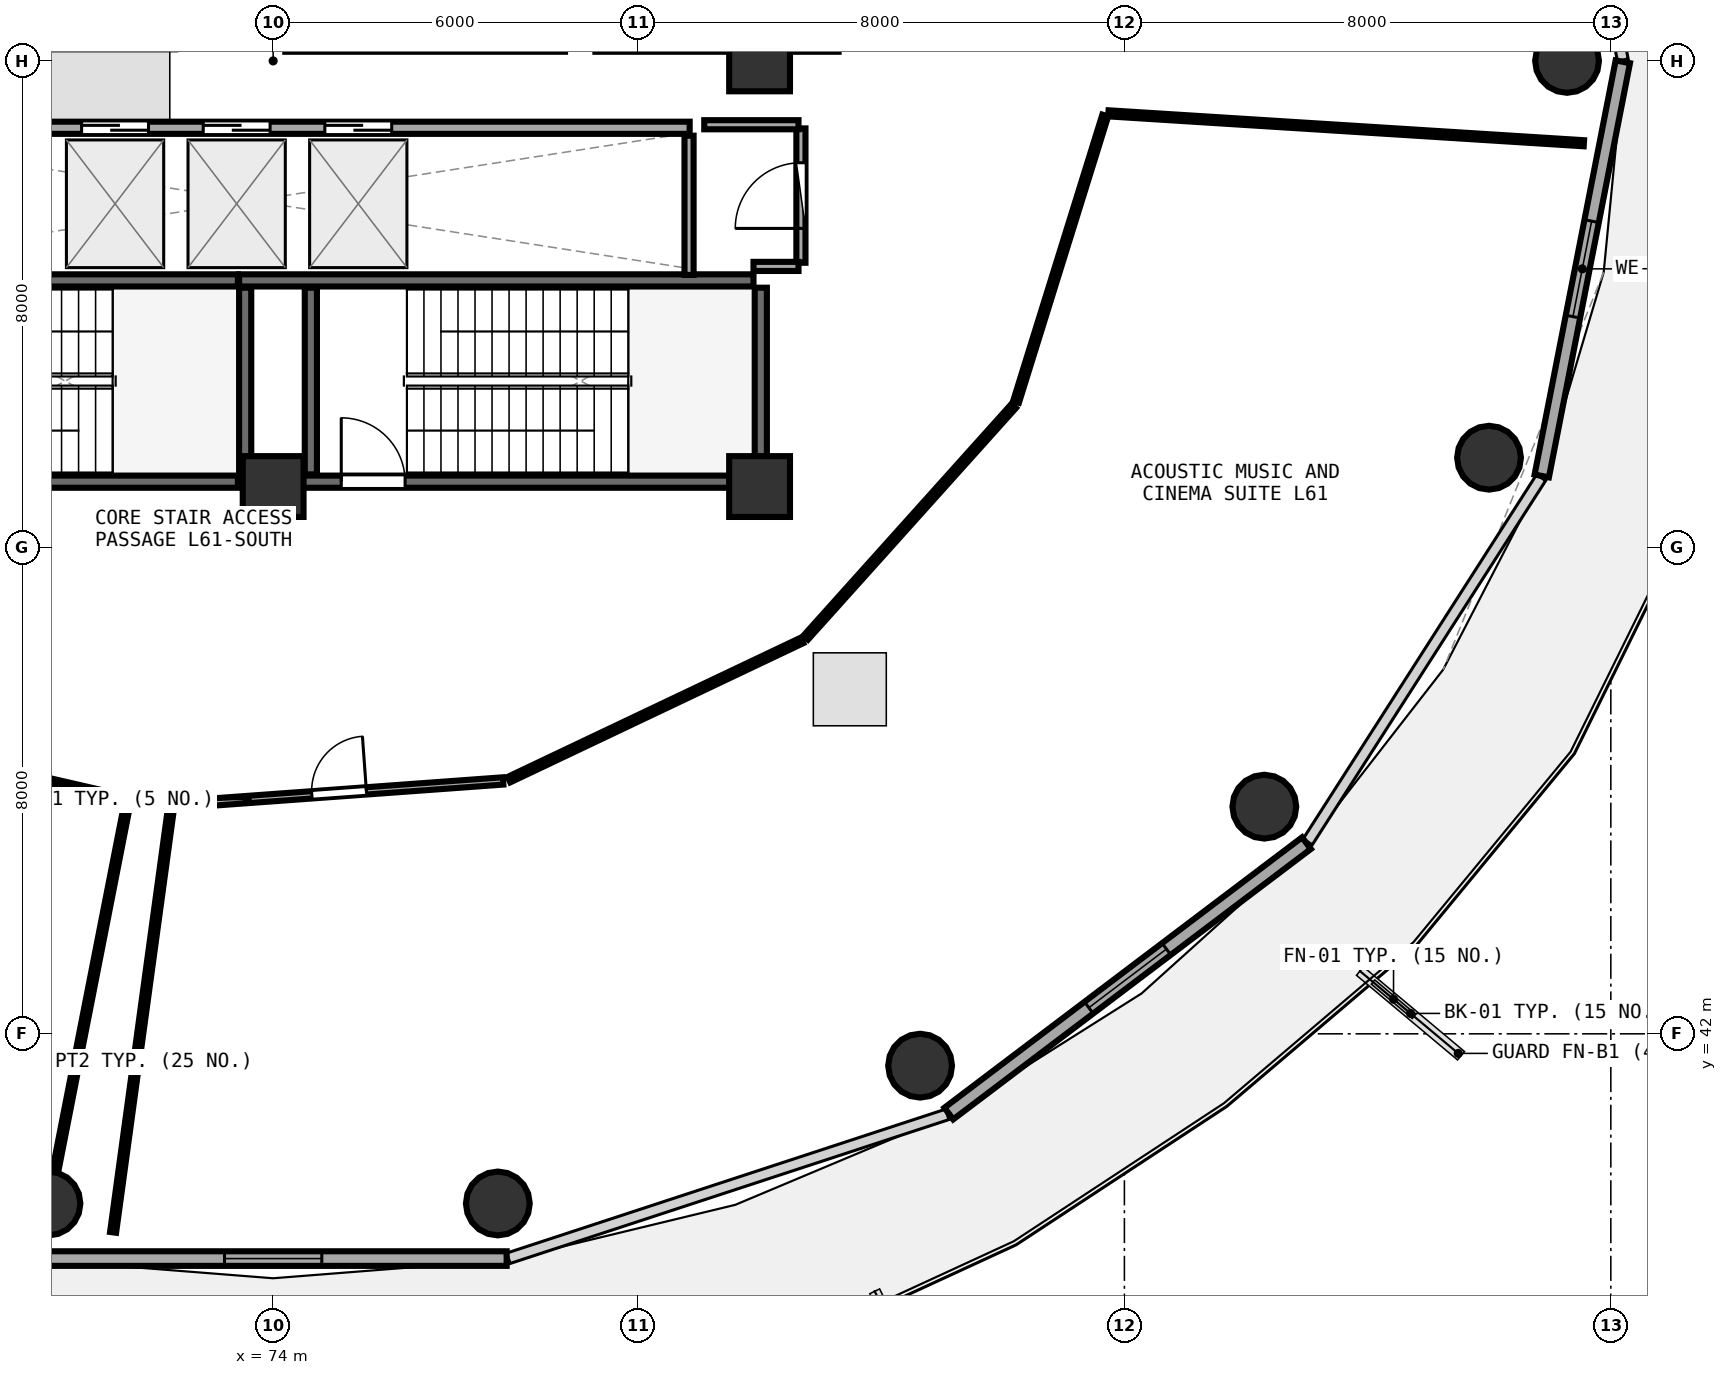
"""IFC4 building model, lengths in metres.
Left out: names, types, materials, properties, quantities, classifications, styles, units other than length and angle.
Written with IfcOpenShell. Run it as: python <this file> out.ifc"""

import sys

from ifc_helpers import new_model, si_unit, direction, frame, frame_2d, origin, origin_2d, place, context, subcontext, project, spatial, rectangle, circle, extrude, element, fill, save


model = new_model("IFC4")
c1 = context("Model", 3, precision=1e-05, world=origin(), true_north=direction((0.0, 1.0)))
c2 = subcontext(c1, "Body", "Model", "MODEL_VIEW")
j1 = project(units=[si_unit("LENGTHUNIT", "METRE"), si_unit("PLANEANGLEUNIT", "RADIAN")], contexts=[c1])
p1 = place(None, origin())
s1 = spatial("IfcSite", under=j1, at=p1, CompositionType="ELEMENT")
p2 = place(p1, origin())
s2 = spatial("IfcBuilding", under=s1, at=p2, CompositionType="ELEMENT")
p3 = place(p2, frame((0.0, 0.0, 238.2)))
s3 = spatial("IfcBuildingStorey", under=s2, at=p3, CompositionType="ELEMENT", Elevation=238.2)
for number, where, z_axis, x_axis in (
    (1, (74.0, 51.0, 0.0), (0.0, 0.0, 1.0), (1.0, 0.0, 0.0)),
    (2, (82.0, 51.0, 0.0), (0.0, 0.0, 1.0), (1.0, 0.0, 0.0)),
    (3, (82.0, 58.0, 0.0), (0.0, 0.0, 1.0), (1.0, 0.0, 0.0)),
):
    element("IfcColumn", number, at=place(p3, frame(where, z_axis=z_axis, x_axis=x_axis)), inside=s3, PredefinedType="PILASTER", context=c2, shape_type="SweptSolid", body=[
        extrude(rectangle(XDim=1.0, YDim=1.0, at=origin_2d()), origin(), (0.0, 0.0, 1.0), 4.76),
    ])
for number, where, z_axis, x_axis in (
    (4, (95.28, 58.0, 0.0), (0.0, 0.0, 1.0), (1.0, 0.0, 0.0)),
    (5, (70.305, 39.21, 0.0), (0.0, 0.0, 1.0), (1.0, 0.0, 0.0)),
    (6, (77.695, 39.21, 0.0), (0.0, 0.0, 1.0), (1.0, 0.0, 0.0)),
    (7, (84.64, 41.476, 0.0), (0.0, 0.0, 1.0), (1.0, 0.0, 0.0)),
    (8, (90.302, 45.736, 0.0), (0.0, 0.0, 1.0), (1.0, 0.0, 0.0)),
    (9, (93.997, 51.474, 0.0), (0.0, 0.0, 1.0), (1.0, 0.0, 0.0)),
):
    element("IfcColumn", number, at=place(p3, frame(where, z_axis=z_axis, x_axis=x_axis)), inside=s3, PredefinedType="COLUMN", context=c2, shape_type="SweptSolid", body=[
        extrude(circle(Radius=0.525, at=origin_2d()), origin(), (0.0, 0.0, 1.0), 4.76),
    ])
p4 = place(p3, frame((70.16, 38.304, 0.0), z_axis=(0.0, 0.0, 1.0), x_axis=(1.0, 0.0, 0.0)))
e10 = element("IfcWall", 10, at=p4, inside=s3, PredefinedType="SOLIDWALL", context=c2, shape_type="SweptSolid", body=[
    extrude(rectangle(XDim=7.68, YDim=0.24, at=frame_2d((3.84, 0.0))), origin(), (0.0, 0.0, 1.0), 4.345),
])
p5 = place(p4, frame((3.04, 0.0, 0.85)))
e11 = element("IfcOpeningElement", 11, at=p5, cuts=e10, PredefinedType="OPENING", context=c2, shape_type="SweptSolid", body=[
    extrude(rectangle(XDim=1.6, YDim=1.45, at=frame_2d((0.8, 0.725))), frame((0.0, 0.13, 0.0), z_axis=(0.0, -1.0, 0.0), x_axis=(1.0, 0.0, 0.0)), (0.0, 0.0, 1.0), 0.26),
])
p6 = place(p3, frame((85.112, 40.688, 0.0), z_axis=(0.0, 0.0, 1.0), x_axis=(0.797701674595, 0.603052268338, 0.0)))
e12 = element("IfcWall", 12, at=p6, inside=s3, PredefinedType="SOLIDWALL", context=c2, shape_type="SweptSolid", body=[
    extrude(rectangle(XDim=7.374, YDim=0.24, at=frame_2d((3.687, 0.0))), origin(), (0.0, 0.0, 1.0), 4.345),
])
p7 = place(p6, frame((2.887, 0.0, 0.85)))
e13 = element("IfcOpeningElement", 13, at=p7, cuts=e12, PredefinedType="OPENING", context=c2, shape_type="SweptSolid", body=[
    extrude(rectangle(XDim=1.6, YDim=1.45, at=frame_2d((0.8, 0.725))), frame((0.0, 0.13, 0.0), z_axis=(0.0, -1.0, 0.0), x_axis=(1.0, 0.0, 0.0)), (0.0, 0.0, 1.0), 0.26),
])
p8 = place(p3, frame((94.864, 51.174, 0.0), z_axis=(0.0, 0.0, 1.0), x_axis=(0.192069055673, 0.981381413036, 0.0)))
e14 = element("IfcWall", 14, at=p8, inside=s3, PredefinedType="SOLIDWALL", context=c2, shape_type="SweptSolid", body=[
    extrude(rectangle(XDim=6.94, YDim=0.24, at=frame_2d((3.47, 0.0))), origin(), (0.0, 0.0, 1.0), 4.345),
])
p9 = place(p8, frame((2.67, 0.0, 0.85)))
e15 = element("IfcOpeningElement", 15, at=p9, cuts=e14, PredefinedType="OPENING", context=c2, shape_type="SweptSolid", body=[
    extrude(rectangle(XDim=1.6, YDim=1.45, at=frame_2d((0.8, 0.725))), frame((0.0, 0.13, 0.0), z_axis=(0.0, -1.0, 0.0), x_axis=(1.0, 0.0, 0.0)), (0.0, 0.0, 1.0), 0.26),
])
p10 = place(p3, frame((74.0, 51.08, 0.0), z_axis=(0.0, 0.0, 1.0), x_axis=(1.0, 0.0, 0.0)))
e16 = element("IfcWall", 16, at=p10, inside=s3, PredefinedType="SHEAR", context=c2, shape_type="SweptSolid", body=[
    extrude(rectangle(XDim=7.9, YDim=0.2, at=frame_2d((3.95, 0.0))), origin(), (0.0, 0.0, 1.0), 4.36),
])
p11 = place(p10, frame((1.12, 0.0, 0.0)))
e17 = element("IfcOpeningElement", 17, at=p11, cuts=e16, PredefinedType="OPENING", context=c2, shape_type="SweptSolid", body=[
    extrude(rectangle(XDim=1.05, YDim=2.1, at=frame_2d((0.525, 1.05))), frame((0.0, 0.11, 0.0), z_axis=(0.0, -1.0, 0.0), x_axis=(1.0, 0.0, 0.0)), (0.0, 0.0, 1.0), 0.22),
])
p12 = place(p3, frame((82.02, 51.2, 0.0), z_axis=(0.0, 0.0, 1.0), x_axis=(0.0, 1.0, 0.0)))
e18 = element("IfcWall", 18, at=p12, inside=s3, PredefinedType="SHEAR", context=c2, shape_type="SweptSolid", body=[
    extrude(rectangle(XDim=3.07, YDim=0.2, at=frame_2d((1.535, 0.0))), origin(), (0.0, 0.0, 1.0), 4.36),
])
p13 = place(p3, frame((81.9, 54.39, 0.0), z_axis=(0.0, 0.0, 1.0), x_axis=(-1.0, 0.0, 0.0)))
e19 = element("IfcWall", 19, at=p13, inside=s3, PredefinedType="SHEAR", context=c2, shape_type="SweptSolid", body=[
    extrude(rectangle(XDim=8.46, YDim=0.2, at=frame_2d((4.23, 0.0))), origin(), (0.0, 0.0, 1.0), 4.36),
])
p14 = place(p3, frame((74.62, 54.27, 0.0), z_axis=(0.0, 0.0, 1.0), x_axis=(0.0, -1.0, 0.0)))
e20 = element("IfcWall", 20, at=p14, inside=s3, PredefinedType="SHEAR", context=c2, shape_type="SweptSolid", body=[
    extrude(rectangle(XDim=3.07, YDim=0.2, at=frame_2d((1.535, 0.0))), origin(), (0.0, 0.0, 1.0), 4.36),
])
p15 = place(p3, frame((66.26, 51.08, 0.0), z_axis=(0.0, 0.0, 1.0), x_axis=(1.0, 0.0, 0.0)))
e21 = element("IfcWall", 21, at=p15, inside=s3, PredefinedType="SHEAR", context=c2, shape_type="SweptSolid", body=[
    extrude(rectangle(XDim=7.16, YDim=0.2, at=frame_2d((3.58, 0.0))), origin(), (0.0, 0.0, 1.0), 4.36),
])
p16 = place(p3, frame((73.54, 51.2, 0.0), z_axis=(0.0, 0.0, 1.0), x_axis=(0.0, 1.0, 0.0)))
e22 = element("IfcWall", 22, at=p16, inside=s3, PredefinedType="SHEAR", context=c2, shape_type="SweptSolid", body=[
    extrude(rectangle(XDim=3.07, YDim=0.2, at=frame_2d((1.535, 0.0))), origin(), (0.0, 0.0, 1.0), 4.36),
])
p17 = place(p3, frame((73.42, 54.39, 0.0), z_axis=(0.0, 0.0, 1.0), x_axis=(-1.0, 0.0, 0.0)))
e23 = element("IfcWall", 23, at=p17, inside=s3, PredefinedType="SHEAR", context=c2, shape_type="SweptSolid", body=[
    extrude(rectangle(XDim=7.16, YDim=0.2, at=frame_2d((3.58, 0.0))), origin(), (0.0, 0.0, 1.0), 4.36),
])
p18 = place(p3, frame((66.45, 56.9, 0.0), z_axis=(0.0, 0.0, 1.0), x_axis=(1.0, 0.0, 0.0)))
e24 = element("IfcWall", 24, at=p18, inside=s3, PredefinedType="SOLIDWALL", context=c2, shape_type="SweptSolid", body=[
    extrude(rectangle(XDim=14.4, YDim=0.2, at=frame_2d((7.2, 0.0))), origin(), (0.0, 0.0, 1.0), 4.35),
])
p19 = place(p18, frame((0.4, 0.0, 0.0)))
e25 = element("IfcOpeningElement", 25, at=p19, cuts=e24, PredefinedType="OPENING", context=c2, shape_type="SweptSolid", body=[
    extrude(rectangle(XDim=1.1, YDim=2.1, at=frame_2d((0.55, 1.05))), frame((0.0, 0.11, 0.0), z_axis=(0.0, -1.0, 0.0), x_axis=(1.0, 0.0, 0.0)), (0.0, 0.0, 1.0), 0.22),
])
p20 = place(p18, frame((2.4, 0.0, 0.0)))
e26 = element("IfcOpeningElement", 26, at=p20, cuts=e24, PredefinedType="OPENING", context=c2, shape_type="SweptSolid", body=[
    extrude(rectangle(XDim=1.1, YDim=2.1, at=frame_2d((0.55, 1.05))), frame((0.0, 0.11, 0.0), z_axis=(0.0, -1.0, 0.0), x_axis=(1.0, 0.0, 0.0)), (0.0, 0.0, 1.0), 0.22),
])
p21 = place(p18, frame((4.4, 0.0, 0.0)))
e27 = element("IfcOpeningElement", 27, at=p21, cuts=e24, PredefinedType="OPENING", context=c2, shape_type="SweptSolid", body=[
    extrude(rectangle(XDim=1.1, YDim=2.1, at=frame_2d((0.55, 1.05))), frame((0.0, 0.11, 0.0), z_axis=(0.0, -1.0, 0.0), x_axis=(1.0, 0.0, 0.0)), (0.0, 0.0, 1.0), 0.22),
])
p22 = place(p18, frame((6.4, 0.0, 0.0)))
e28 = element("IfcOpeningElement", 28, at=p22, cuts=e24, PredefinedType="OPENING", context=c2, shape_type="SweptSolid", body=[
    extrude(rectangle(XDim=1.1, YDim=2.1, at=frame_2d((0.55, 1.05))), frame((0.0, 0.11, 0.0), z_axis=(0.0, -1.0, 0.0), x_axis=(1.0, 0.0, 0.0)), (0.0, 0.0, 1.0), 0.22),
])
p23 = place(p18, frame((8.4, 0.0, 0.0)))
e29 = element("IfcOpeningElement", 29, at=p23, cuts=e24, PredefinedType="OPENING", context=c2, shape_type="SweptSolid", body=[
    extrude(rectangle(XDim=1.1, YDim=2.1, at=frame_2d((0.55, 1.05))), frame((0.0, 0.11, 0.0), z_axis=(0.0, -1.0, 0.0), x_axis=(1.0, 0.0, 0.0)), (0.0, 0.0, 1.0), 0.22),
])
p24 = place(p3, frame((80.84, 54.48, 0.0), z_axis=(0.0, 0.0, 1.0), x_axis=(0.0, 1.0, 0.0)))
e30 = element("IfcWall", 30, at=p24, inside=s3, PredefinedType="PARTITIONING", context=c2, shape_type="SweptSolid", body=[
    extrude(rectangle(XDim=2.29, YDim=0.15, at=frame_2d((1.145, 0.0))), origin(), (0.0, 0.0, 1.0), 4.35),
])
p25 = place(p3, frame((82.68, 54.68, 0.0), z_axis=(0.0, 0.0, 1.0), x_axis=(0.0, 1.0, 0.0)))
e31 = element("IfcWall", 31, at=p25, inside=s3, PredefinedType="PARTITIONING", context=c2, shape_type="SweptSolid", body=[
    extrude(rectangle(XDim=2.21, YDim=0.15, at=frame_2d((1.105, 0.0))), origin(), (0.0, 0.0, 1.0), 4.35),
])
p26 = place(p25, frame((0.565, 0.0, 0.0)))
e32 = element("IfcOpeningElement", 32, at=p26, cuts=e31, PredefinedType="OPENING", context=c2, shape_type="SweptSolid", body=[
    extrude(rectangle(XDim=1.08, YDim=2.1, at=frame_2d((0.54, 1.05))), frame((0.0, 0.085, 0.0), z_axis=(0.0, -1.0, 0.0), x_axis=(1.0, 0.0, 0.0)), (0.0, 0.0, 1.0), 0.17),
])
p27 = place(p3, frame((72.387, 45.766, 0.0), z_axis=(0.0, 0.0, 1.0), x_axis=(0.997366707309, 0.072523452427, 0.0)))
e33 = element("IfcWall", 33, at=p27, inside=s3, PredefinedType="PARTITIONING", context=c2, shape_type="SweptSolid", body=[
    extrude(rectangle(XDim=5.41, YDim=0.12, at=frame_2d((2.705, 0.0))), origin(), (0.0, 0.0, 1.0), 2.345),
])
p28 = place(p27, frame((2.255, 0.0, 0.0)))
e34 = element("IfcOpeningElement", 34, at=p28, cuts=e33, PredefinedType="OPENING", context=c2, shape_type="SweptSolid", body=[
    extrude(rectangle(XDim=0.9, YDim=2.08, at=frame_2d((0.45, 1.04))), frame((0.0, 0.07, 0.0), z_axis=(0.0, -1.0, 0.0), x_axis=(1.0, 0.0, 0.0)), (0.0, 0.0, 1.0), 0.14),
])
p29 = place(p3, frame((81.9, 54.62, 0.0), z_axis=(0.0, 0.0, 1.0), x_axis=(1.0, 0.0, 0.0)))
e35 = element("IfcWall", 35, at=p29, inside=s3, PredefinedType="PARTITIONING", context=c2, shape_type="SweptSolid", body=[
    extrude(rectangle(XDim=0.74, YDim=0.15, at=frame_2d((0.37, 0.0))), origin(), (0.0, 0.0, 1.0), 3.645),
])
p30 = place(p3, frame((82.64, 56.95, 0.0), z_axis=(0.0, 0.0, 1.0), x_axis=(-1.0, 0.0, 0.0)))
e36 = element("IfcWall", 36, at=p30, inside=s3, PredefinedType="PARTITIONING", context=c2, shape_type="SweptSolid", body=[
    extrude(rectangle(XDim=1.55, YDim=0.15, at=frame_2d((0.775, 0.0))), origin(), (0.0, 0.0, 1.0), 3.645),
])
p31 = place(p3, frame((69.626, 46.315, 0.0), z_axis=(0.0, 0.0, 1.0), x_axis=(0.974526673994, -0.224271624762, 0.0)))
e37 = element("IfcWall", 37, at=p31, inside=s3, PredefinedType="PARTITIONING", context=c2, shape_type="SweptSolid", body=[
    extrude(rectangle(XDim=2.002, YDim=0.1, at=frame_2d((1.001, 0.0))), origin(), (0.0, 0.0, 1.0), 4.35),
])
p32 = place(p3, frame((71.608, 45.818, 0.0), z_axis=(0.0, 0.0, 1.0), x_axis=(-0.19242564028, -0.981311557541, 0.0)))
e38 = element("IfcWall", 38, at=p32, inside=s3, PredefinedType="PARTITIONING", context=c2, shape_type="SweptSolid", body=[
    extrude(rectangle(XDim=6.185, YDim=0.1, at=frame_2d((3.093, 0.0))), origin(), (0.0, 0.0, 1.0), 2.345),
])
p33 = place(p3, frame((77.878, 46.18, 0.0), z_axis=(0.0, 0.0, 1.0), x_axis=(0.903304994033, 0.428998936775, 0.0)))
e39 = element("IfcWall", 39, at=p33, inside=s3, PredefinedType="PARTITIONING", context=c2, shape_type="SweptSolid", body=[
    extrude(rectangle(XDim=5.335, YDim=0.1, at=frame_2d((2.667, 0.0))), origin(), (0.0, 0.0, 1.0), 2.345),
])
p34 = place(p3, frame((82.76, 48.516, 0.0), z_axis=(0.0, 0.0, 1.0), x_axis=(0.66809195956, 0.744078714634, 0.0)))
e40 = element("IfcWall", 40, at=p34, inside=s3, PredefinedType="PARTITIONING", context=c2, shape_type="SweptSolid", body=[
    extrude(rectangle(XDim=5.118, YDim=0.1, at=frame_2d((2.559, 0.0))), origin(), (0.0, 0.0, 1.0), 2.345),
])
p35 = place(p3, frame((86.218, 52.392, 0.0), z_axis=(0.0, 0.0, 1.0), x_axis=(0.297398450887, 0.954753455825, 0.0)))
e41 = element("IfcWall", 41, at=p35, inside=s3, PredefinedType="PARTITIONING", context=c2, shape_type="SweptSolid", body=[
    extrude(rectangle(XDim=4.933, YDim=0.1, at=frame_2d((2.466, 0.0))), origin(), (0.0, 0.0, 1.0), 4.35),
])
p36 = place(p3, frame((87.737, 57.137, 0.0), z_axis=(0.0, 0.0, 1.0), x_axis=(0.998027280213, -0.062781748552, 0.0)))
e42 = element("IfcWall", 42, at=p36, inside=s3, PredefinedType="PARTITIONING", context=c2, shape_type="SweptSolid", body=[
    extrude(rectangle(XDim=7.836, YDim=0.1, at=frame_2d((3.918, 0.0))), origin(), (0.0, 0.0, 1.0), 2.345),
])
p37 = place(p3, frame((71.367, 38.735, 0.0), z_axis=(0.0, 0.0, 1.0), x_axis=(0.135283127844, 0.990806981869, 0.0)))
e43 = element("IfcWall", 43, at=p37, inside=s3, PredefinedType="PARTITIONING", context=c2, shape_type="SweptSolid", body=[
    extrude(rectangle(XDim=7.053, YDim=0.1, at=frame_2d((3.526, 0.0))), origin(), (0.0, 0.0, 1.0), 2.345),
])
p38 = place(p5, origin())
e44 = element("IfcWindow", 44, at=p38, inside=s3, PartitioningType="SINGLE_PANEL", PredefinedType="WINDOW", context=c2, shape_type="SweptSolid", body=[
    extrude(rectangle(XDim=1.6, YDim=1.45, at=frame_2d((0.8, 0.725))), frame((0.0, 0.03, 0.0), z_axis=(0.0, -1.0, 0.0), x_axis=(1.0, 0.0, 0.0)), (0.0, 0.0, 1.0), 0.06),
])
fill(e11, e44)
p39 = place(p7, origin())
e45 = element("IfcWindow", 45, at=p39, inside=s3, PartitioningType="SINGLE_PANEL", PredefinedType="WINDOW", context=c2, shape_type="SweptSolid", body=[
    extrude(rectangle(XDim=1.6, YDim=1.45, at=frame_2d((0.8, 0.725))), frame((0.0, 0.03, 0.0), z_axis=(0.0, -1.0, 0.0), x_axis=(1.0, 0.0, 0.0)), (0.0, 0.0, 1.0), 0.06),
])
fill(e13, e45)
p40 = place(p9, origin())
e46 = element("IfcWindow", 46, at=p40, inside=s3, PartitioningType="SINGLE_PANEL", PredefinedType="WINDOW", context=c2, shape_type="SweptSolid", body=[
    extrude(rectangle(XDim=1.6, YDim=1.45, at=frame_2d((0.8, 0.725))), frame((0.0, 0.03, 0.0), z_axis=(0.0, -1.0, 0.0), x_axis=(1.0, 0.0, 0.0)), (0.0, 0.0, 1.0), 0.06),
])
fill(e15, e46)
p41 = place(p11, origin())
e47 = element("IfcDoor", 47, at=p41, inside=s3, OperationType="SINGLE_SWING_LEFT", PredefinedType="DOOR", context=c2, shape_type="SweptSolid", body=[
    extrude(rectangle(XDim=1.05, YDim=2.1, at=frame_2d((0.525, 1.05))), frame((0.0, 0.025, 0.0), z_axis=(0.0, -1.0, 0.0), x_axis=(1.0, 0.0, 0.0)), (0.0, 0.0, 1.0), 0.05),
])
fill(e17, e47)
p42 = place(p21, origin())
e48 = element("IfcDoor", 48, at=p42, inside=s3, OperationType="DOUBLE_DOOR_SLIDING", PredefinedType="DOOR", context=c2, shape_type="SweptSolid", body=[
    extrude(rectangle(XDim=1.1, YDim=2.1, at=frame_2d((0.55, 1.05))), frame((0.0, 0.025, 0.0), z_axis=(0.0, -1.0, 0.0), x_axis=(1.0, 0.0, 0.0)), (0.0, 0.0, 1.0), 0.05),
])
fill(e27, e48)
p43 = place(p22, origin())
e49 = element("IfcDoor", 49, at=p43, inside=s3, OperationType="DOUBLE_DOOR_SLIDING", PredefinedType="DOOR", context=c2, shape_type="SweptSolid", body=[
    extrude(rectangle(XDim=1.1, YDim=2.1, at=frame_2d((0.55, 1.05))), frame((0.0, 0.025, 0.0), z_axis=(0.0, -1.0, 0.0), x_axis=(1.0, 0.0, 0.0)), (0.0, 0.0, 1.0), 0.05),
])
fill(e28, e49)
p44 = place(p23, origin())
e50 = element("IfcDoor", 50, at=p44, inside=s3, OperationType="DOUBLE_DOOR_SLIDING", PredefinedType="DOOR", context=c2, shape_type="SweptSolid", body=[
    extrude(rectangle(XDim=1.1, YDim=2.1, at=frame_2d((0.55, 1.05))), frame((0.0, 0.025, 0.0), z_axis=(0.0, -1.0, 0.0), x_axis=(1.0, 0.0, 0.0)), (0.0, 0.0, 1.0), 0.05),
])
fill(e29, e50)
p45 = place(p26, origin())
e51 = element("IfcDoor", 51, at=p45, inside=s3, OperationType="SINGLE_SWING_LEFT", PredefinedType="DOOR", context=c2, shape_type="SweptSolid", body=[
    extrude(rectangle(XDim=1.08, YDim=2.1, at=frame_2d((0.54, 1.05))), frame((0.0, 0.025, 0.0), z_axis=(0.0, -1.0, 0.0), x_axis=(1.0, 0.0, 0.0)), (0.0, 0.0, 1.0), 0.05),
])
fill(e32, e51)
p46 = place(p28, origin())
e52 = element("IfcDoor", 52, at=p46, inside=s3, OperationType="SINGLE_SWING_RIGHT", PredefinedType="DOOR", context=c2, shape_type="SweptSolid", body=[
    extrude(rectangle(XDim=0.9, YDim=2.08, at=frame_2d((0.45, 1.04))), frame((0.0, 0.025, 0.0), z_axis=(0.0, -1.0, 0.0), x_axis=(1.0, 0.0, 0.0)), (0.0, 0.0, 1.0), 0.05),
])
fill(e34, e52)
save(model, sys.argv[1])
